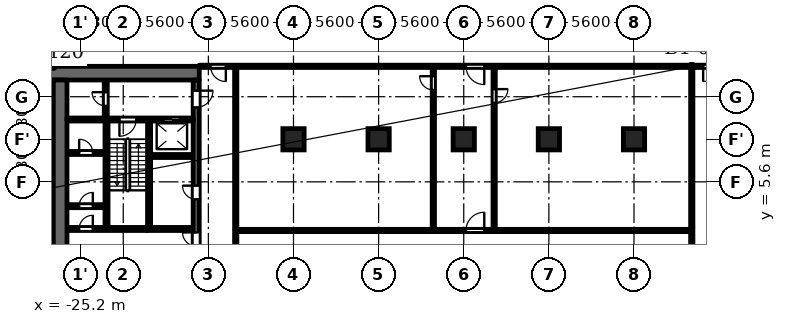
"""IFC4 building model, lengths in metres.
Left out: names, types, materials, properties, quantities, classifications, styles, units other than length and angle.
Written with IfcOpenShell. Run it as: python <this file> out.ifc"""

import sys

from ifc_helpers import new_model, si_unit, direction, frame, frame_2d, origin, origin_2d, place, context, subcontext, project, spatial, polyline, rectangle, outline, extrude, element, fill, save


model = new_model("IFC4")
c1 = context("Model", 3, precision=1e-05, world=origin(), true_north=direction((0.0, 1.0)))
c2 = subcontext(c1, "Body", "Model", "MODEL_VIEW")
j1 = project(units=[si_unit("LENGTHUNIT", "METRE"), si_unit("PLANEANGLEUNIT", "RADIAN")], contexts=[c1])
p1 = place(None, origin())
s1 = spatial("IfcSite", under=j1, at=p1, CompositionType="ELEMENT")
p2 = place(p1, origin())
s2 = spatial("IfcBuilding", under=s1, at=p2, CompositionType="ELEMENT")
p3 = place(p2, frame((0.0, 0.0, -4.5)))
s3 = spatial("IfcBuildingStorey", under=s2, at=p3, CompositionType="ELEMENT", Elevation=-4.5)
p4 = place(p3, frame((0.0, 0.0, -0.5)))
e1 = element("IfcWall", 1, at=p4, inside=s3, PredefinedType="SOLIDWALL", context=c2, shape_type="SweptSolid", body=[
    extrude(outline(polyline([(-29.45, 10.0), (-28.95, 10.0), (-28.95, 14.49), (-28.472, 16.996), (-27.038, 19.105), (-26.144, 20.0), (-26.851, 20.0), (-27.425, 19.426), (-28.944, 17.191), (-29.45, 14.537), (-29.45, 10.0)])), origin(), (0.0, 0.0, 1.0), 5.0),
])
for number, where, z_axis, x_axis in (
    (2, (-28.0, 11.2, 0.0), (0.0, 0.0, 1.0), (1.0, 0.0, 0.0)),
    (3, (-28.0, 5.6, 0.0), (0.0, 0.0, 1.0), (1.0, 0.0, 0.0)),
):
    element("IfcColumn", number, at=place(p3, frame(where, z_axis=z_axis, x_axis=x_axis)), inside=s3, PredefinedType="COLUMN", context=c2, shape_type="SweptSolid", body=[
        extrude(rectangle(XDim=1.8, YDim=1.8, at=origin_2d()), origin(), (0.0, 0.0, 1.0), 4.5),
    ])
for number, where, z_axis, x_axis in (
    (4, (-11.2, 8.4, 0.0), (0.0, 0.0, 1.0), (1.0, 0.0, 0.0)),
    (5, (-5.6, 8.4, 0.0), (0.0, 0.0, 1.0), (1.0, 0.0, 0.0)),
    (6, (0.0, 8.4, 0.0), (0.0, 0.0, 1.0), (1.0, 0.0, 0.0)),
    (7, (5.6, 8.4, 0.0), (0.0, 0.0, 1.0), (1.0, 0.0, 0.0)),
    (8, (11.2, 8.4, 0.0), (0.0, 0.0, 1.0), (1.0, 0.0, 0.0)),
):
    element("IfcColumn", number, at=place(p3, frame(where, z_axis=z_axis, x_axis=x_axis)), inside=s3, PredefinedType="COLUMN", context=c2, shape_type="SweptSolid", body=[
        extrude(rectangle(XDim=1.4, YDim=1.4, at=origin_2d()), origin(), (0.0, 0.0, 1.0), 4.5),
    ])
p5 = place(p3, frame((-20.7, 2.6, 0.0), z_axis=(0.0, 0.0, 1.0), x_axis=(0.0, 1.0, 0.0)))
e9 = element("IfcWall", 9, at=p5, inside=s3, PredefinedType="SHEAR", context=c2, shape_type="SweptSolid", body=[
    extrude(rectangle(XDim=7.0, YDim=0.2, at=frame_2d((3.5, 0.0))), origin(), (0.0, 0.0, 1.0), 4.05),
])
p6 = place(p3, frame((-20.8, 2.5, 0.0), z_axis=(0.0, 0.0, 1.0), x_axis=(-1.0, 0.0, 0.0)))
e10 = element("IfcWall", 10, at=p6, inside=s3, PredefinedType="SHEAR", context=c2, shape_type="SweptSolid", body=[
    extrude(rectangle(XDim=5.3, YDim=0.2, at=frame_2d((2.65, 0.0))), origin(), (0.0, 0.0, 1.0), 4.05),
])
p7 = place(p6, frame((3.6, 0.0, 0.0)))
e11 = element("IfcOpeningElement", 11, at=p7, cuts=e10, PredefinedType="OPENING", context=c2, shape_type="SweptSolid", body=[
    extrude(rectangle(XDim=0.9, YDim=2.1, at=frame_2d((0.45, 1.05))), frame((0.0, 0.11, 0.0), z_axis=(0.0, -1.0, 0.0), x_axis=(1.0, 0.0, 0.0)), (0.0, 0.0, 1.0), 0.22),
])
p8 = place(p3, frame((-17.4, 12.75, 0.0), z_axis=(0.0, 0.0, 1.0), x_axis=(-1.0, 0.0, 0.0)))
e12 = element("IfcWall", 12, at=p8, inside=s3, PredefinedType="SHEAR", context=c2, shape_type="SweptSolid", body=[
    extrude(rectangle(XDim=10.4, YDim=0.9, at=frame_2d((5.2, 0.0))), origin(), (0.0, 0.0, 1.0), 4.05),
])
p9 = place(p3, frame((-17.6, -12.3, 0.0), z_axis=(0.0, 0.0, 1.0), x_axis=(0.0, 1.0, 0.0)))
e13 = element("IfcWall", 13, at=p9, inside=s3, PredefinedType="SHEAR", context=c2, shape_type="SweptSolid", body=[
    extrude(rectangle(XDim=24.6, YDim=0.4, at=frame_2d((12.3, 0.0))), origin(), (0.0, 0.0, 1.0), 4.05),
])
p10 = place(p9, frame((6.0, 0.0, 0.0)))
e14 = element("IfcOpeningElement", 14, at=p10, cuts=e13, PredefinedType="OPENING", context=c2, shape_type="SweptSolid", body=[
    extrude(rectangle(XDim=1.1, YDim=2.1, at=frame_2d((0.55, 1.05))), frame((0.0, 0.21, 0.0), z_axis=(0.0, -1.0, 0.0), x_axis=(1.0, 0.0, 0.0)), (0.0, 0.0, 1.0), 0.42),
])
p11 = place(p9, frame((8.4, 0.0, 0.0)))
e15 = element("IfcOpeningElement", 15, at=p11, cuts=e13, PredefinedType="OPENING", context=c2, shape_type="SweptSolid", body=[
    extrude(rectangle(XDim=1.1, YDim=2.1, at=frame_2d((0.55, 1.05))), frame((0.0, 0.21, 0.0), z_axis=(0.0, -1.0, 0.0), x_axis=(1.0, 0.0, 0.0)), (0.0, 0.0, 1.0), 0.42),
])
p12 = place(p9, frame((10.8, 0.0, 0.0)))
e16 = element("IfcOpeningElement", 16, at=p12, cuts=e13, PredefinedType="OPENING", context=c2, shape_type="SweptSolid", body=[
    extrude(rectangle(XDim=1.1, YDim=2.1, at=frame_2d((0.55, 1.05))), frame((0.0, 0.21, 0.0), z_axis=(0.0, -1.0, 0.0), x_axis=(1.0, 0.0, 0.0)), (0.0, 0.0, 1.0), 0.42),
])
p13 = place(p9, frame((16.75, 0.0, 0.0)))
e17 = element("IfcOpeningElement", 17, at=p13, cuts=e13, PredefinedType="OPENING", context=c2, shape_type="SweptSolid", body=[
    extrude(rectangle(XDim=0.9, YDim=2.1, at=frame_2d((0.45, 1.05))), frame((0.0, 0.21, 0.0), z_axis=(0.0, -1.0, 0.0), x_axis=(1.0, 0.0, 0.0)), (0.0, 0.0, 1.0), 0.42),
])
p14 = place(p9, frame((22.8, 0.0, 0.0)))
e18 = element("IfcOpeningElement", 18, at=p14, cuts=e13, PredefinedType="OPENING", context=c2, shape_type="SweptSolid", body=[
    extrude(rectangle(XDim=1.1, YDim=2.1, at=frame_2d((0.55, 1.05))), frame((0.0, 0.21, 0.0), z_axis=(0.0, -1.0, 0.0), x_axis=(1.0, 0.0, 0.0)), (0.0, 0.0, 1.0), 0.42),
])
p15 = place(p9, frame((0.7, 0.0, 0.0)))
e19 = element("IfcOpeningElement", 19, at=p15, cuts=e13, PredefinedType="OPENING", context=c2, shape_type="SweptSolid", body=[
    extrude(rectangle(XDim=1.1, YDim=2.1, at=frame_2d((0.55, 1.05))), frame((0.0, 0.21, 0.0), z_axis=(0.0, -1.0, 0.0), x_axis=(1.0, 0.0, 0.0)), (0.0, 0.0, 1.0), 0.42),
])
p16 = place(p9, frame((12.775, 0.0, 0.0)))
e20 = element("IfcOpeningElement", 20, at=p16, cuts=e13, PredefinedType="OPENING", context=c2, shape_type="SweptSolid", body=[
    extrude(rectangle(XDim=1.8, YDim=2.1, at=frame_2d((0.9, 1.05))), frame((0.0, 0.21, 0.0), z_axis=(0.0, -1.0, 0.0), x_axis=(1.0, 0.0, 0.0)), (0.0, 0.0, 1.0), 0.42),
])
p17 = place(p3, frame((-26.55, -12.3, 0.0), z_axis=(0.0, 0.0, 1.0), x_axis=(0.0, 1.0, 0.0)))
e21 = element("IfcWall", 21, at=p17, inside=s3, PredefinedType="SHEAR", context=c2, shape_type="SweptSolid", body=[
    extrude(rectangle(XDim=24.6, YDim=0.9, at=frame_2d((12.3, 0.0))), origin(), (0.0, 0.0, 1.0), 4.05),
])
p18 = place(p3, frame((-23.55, 9.8, 0.0), z_axis=(0.0, 0.0, 1.0), x_axis=(0.0, 1.0, 0.0)))
e22 = element("IfcWall", 22, at=p18, inside=s3, PredefinedType="PARTITIONING", context=c2, shape_type="SweptSolid", body=[
    extrude(rectangle(XDim=2.5, YDim=0.2, at=frame_2d((1.25, 0.0))), origin(), (0.0, 0.0, 1.0), 4.05),
])
p19 = place(p18, frame((0.8, 0.0, 0.0)))
e23 = element("IfcOpeningElement", 23, at=p19, cuts=e22, PredefinedType="OPENING", context=c2, shape_type="SweptSolid", body=[
    extrude(rectangle(XDim=0.9, YDim=2.1, at=frame_2d((0.45, 1.05))), frame((0.0, 0.11, 0.0), z_axis=(0.0, -1.0, 0.0), x_axis=(1.0, 0.0, 0.0)), (0.0, 0.0, 1.0), 0.22),
])
p20 = place(p3, frame((-23.6, 4.0, 0.0), z_axis=(0.0, 0.0, 1.0), x_axis=(-1.0, 0.0, 0.0)))
e24 = element("IfcWall", 24, at=p20, inside=s3, PredefinedType="PARTITIONING", context=c2, shape_type="SweptSolid", body=[
    extrude(rectangle(XDim=2.5, YDim=0.2, at=frame_2d((1.25, 0.0))), origin(), (0.0, 0.0, 1.0), 4.05),
])
p21 = place(p20, frame((0.8, 0.0, 0.0)))
e25 = element("IfcOpeningElement", 25, at=p21, cuts=e24, PredefinedType="OPENING", context=c2, shape_type="SweptSolid", body=[
    extrude(rectangle(XDim=0.9, YDim=2.1, at=frame_2d((0.45, 1.05))), frame((0.0, 0.11, 0.0), z_axis=(0.0, -1.0, 0.0), x_axis=(1.0, 0.0, 0.0)), (0.0, 0.0, 1.0), 0.22),
])
p22 = place(p3, frame((-23.6, 7.5, 0.0), z_axis=(0.0, 0.0, 1.0), x_axis=(-1.0, 0.0, 0.0)))
e26 = element("IfcWall", 26, at=p22, inside=s3, PredefinedType="PARTITIONING", context=c2, shape_type="SweptSolid", body=[
    extrude(rectangle(XDim=2.5, YDim=0.2, at=frame_2d((1.25, 0.0))), origin(), (0.0, 0.0, 1.0), 4.05),
])
p23 = place(p22, frame((0.8, 0.0, 0.0)))
e27 = element("IfcOpeningElement", 27, at=p23, cuts=e26, PredefinedType="OPENING", context=c2, shape_type="SweptSolid", body=[
    extrude(rectangle(XDim=0.9, YDim=2.1, at=frame_2d((0.45, 1.05))), frame((0.0, 0.11, 0.0), z_axis=(0.0, -1.0, 0.0), x_axis=(1.0, 0.0, 0.0)), (0.0, 0.0, 1.0), 0.22),
])
p24 = place(p3, frame((-17.8, 2.5, 0.0), z_axis=(0.0, 0.0, 1.0), x_axis=(-1.0, 0.0, 0.0)))
e28 = element("IfcWall", 28, at=p24, inside=s3, PredefinedType="PARTITIONING", context=c2, shape_type="SweptSolid", body=[
    extrude(rectangle(XDim=3.0, YDim=0.2, at=frame_2d((1.5, 0.0))), origin(), (0.0, 0.0, 1.0), 4.05),
])
p25 = place(p3, frame((-17.8, 7.3, 0.0), z_axis=(0.0, 0.0, 1.0), x_axis=(-1.0, 0.0, 0.0)))
e29 = element("IfcWall", 29, at=p25, inside=s3, PredefinedType="PARTITIONING", context=c2, shape_type="SweptSolid", body=[
    extrude(rectangle(XDim=2.8, YDim=0.2, at=frame_2d((1.4, 0.0))), origin(), (0.0, 0.0, 1.0), 4.05),
])
p26 = place(p3, frame((-17.8, 9.7, 0.0), z_axis=(0.0, 0.0, 1.0), x_axis=(-1.0, 0.0, 0.0)))
e30 = element("IfcWall", 30, at=p26, inside=s3, PredefinedType="SHEAR", context=c2, shape_type="SweptSolid", body=[
    extrude(rectangle(XDim=8.3, YDim=0.2, at=frame_2d((4.15, 0.0))), origin(), (0.0, 0.0, 1.0), 4.05),
])
p27 = place(p26, frame((0.85, 0.0, 0.0)))
e31 = element("IfcOpeningElement", 31, at=p27, cuts=e30, PredefinedType="OPENING", context=c2, shape_type="SweptSolid", body=[
    extrude(rectangle(XDim=1.1, YDim=2.1, at=frame_2d((0.55, 1.05))), frame((0.0, 0.11, 0.0), z_axis=(0.0, -1.0, 0.0), x_axis=(1.0, 0.0, 0.0)), (0.0, 0.0, 1.0), 0.22),
])
p28 = place(p26, frame((3.75, 0.0, 0.0)))
e32 = element("IfcOpeningElement", 32, at=p28, cuts=e30, PredefinedType="OPENING", context=c2, shape_type="SweptSolid", body=[
    extrude(rectangle(XDim=1.1, YDim=2.1, at=frame_2d((0.55, 1.05))), frame((0.0, 0.11, 0.0), z_axis=(0.0, -1.0, 0.0), x_axis=(1.0, 0.0, 0.0)), (0.0, 0.0, 1.0), 0.22),
])
p29 = place(p3, frame((-23.5, 2.6, 0.0), z_axis=(0.0, 0.0, 1.0), x_axis=(0.0, 1.0, 0.0)))
e33 = element("IfcWall", 33, at=p29, inside=s3, PredefinedType="SHEAR", context=c2, shape_type="SweptSolid", body=[
    extrude(rectangle(XDim=7.0, YDim=0.2, at=frame_2d((3.5, 0.0))), origin(), (0.0, 0.0, 1.0), 4.05),
])
p30 = place(p3, frame((-14.925, 2.4, 0.0), z_axis=(0.0, 0.0, 1.0), x_axis=(1.0, 0.0, 0.0)))
e34 = element("IfcWall", 34, at=p30, inside=s3, PredefinedType="PARTITIONING", context=c2, shape_type="SweptSolid", body=[
    extrude(rectangle(XDim=29.85, YDim=0.15, at=frame_2d((14.925, 0.0))), origin(), (0.0, 0.0, 1.0), 4.05),
])
p31 = place(p30, frame((15.075, 0.0, 0.0)))
e35 = element("IfcOpeningElement", 35, at=p31, cuts=e34, PredefinedType="OPENING", context=c2, shape_type="SweptSolid", body=[
    extrude(rectangle(XDim=1.2, YDim=2.1, at=frame_2d((0.6, 1.05))), frame((0.0, 0.085, 0.0), z_axis=(0.0, -1.0, 0.0), x_axis=(1.0, 0.0, 0.0)), (0.0, 0.0, 1.0), 0.17),
])
p32 = place(p3, frame((-17.4, 13.2, 0.0), z_axis=(0.0, 0.0, 1.0), x_axis=(1.0, 0.0, 0.0)))
e36 = element("IfcWall", 36, at=p32, inside=s3, PredefinedType="PARTITIONING", context=c2, shape_type="SweptSolid", body=[
    extrude(rectangle(XDim=34.8, YDim=0.15, at=frame_2d((17.4, 0.0))), origin(), (0.0, 0.0, 1.0), 4.05),
])
p33 = place(p32, frame((17.55, 0.0, 0.0)))
e37 = element("IfcOpeningElement", 37, at=p33, cuts=e36, PredefinedType="OPENING", context=c2, shape_type="SweptSolid", body=[
    extrude(rectangle(XDim=1.2, YDim=2.1, at=frame_2d((0.6, 1.05))), frame((0.0, 0.085, 0.0), z_axis=(0.0, -1.0, 0.0), x_axis=(1.0, 0.0, 0.0)), (0.0, 0.0, 1.0), 0.17),
])
p34 = place(p32, frame((0.75, 0.0, 0.0)))
e38 = element("IfcOpeningElement", 38, at=p34, cuts=e36, PredefinedType="OPENING", context=c2, shape_type="SweptSolid", body=[
    extrude(rectangle(XDim=1.0, YDim=2.1, at=frame_2d((0.5, 1.05))), frame((0.0, 0.085, 0.0), z_axis=(0.0, -1.0, 0.0), x_axis=(1.0, 0.0, 0.0)), (0.0, 0.0, 1.0), 0.17),
])
p35 = place(p32, frame((33.15, 0.0, 0.0)))
e39 = element("IfcOpeningElement", 39, at=p35, cuts=e36, PredefinedType="OPENING", context=c2, shape_type="SweptSolid", body=[
    extrude(rectangle(XDim=1.0, YDim=2.1, at=frame_2d((0.5, 1.05))), frame((0.0, 0.085, 0.0), z_axis=(0.0, -1.0, 0.0), x_axis=(1.0, 0.0, 0.0)), (0.0, 0.0, 1.0), 0.17),
])
p36 = place(p3, frame((-15.0, -13.125, 0.0), z_axis=(0.0, 0.0, 1.0), x_axis=(0.0, 1.0, 0.0)))
e40 = element("IfcWall", 40, at=p36, inside=s3, PredefinedType="PARTITIONING", context=c2, shape_type="SweptSolid", body=[
    extrude(rectangle(XDim=26.25, YDim=0.15, at=frame_2d((13.125, 0.0))), origin(), (0.0, 0.0, 1.0), 4.05),
])
p37 = place(p36, frame((11.375, 0.0, 0.0)))
e41 = element("IfcOpeningElement", 41, at=p37, cuts=e40, PredefinedType="OPENING", context=c2, shape_type="SweptSolid", body=[
    extrude(rectangle(XDim=1.0, YDim=2.1, at=frame_2d((0.5, 1.05))), frame((0.0, 0.085, 0.0), z_axis=(0.0, -1.0, 0.0), x_axis=(1.0, 0.0, 0.0)), (0.0, 0.0, 1.0), 0.17),
])
p38 = place(p3, frame((-2.0, 2.475, 0.0), z_axis=(0.0, 0.0, 1.0), x_axis=(0.0, 1.0, 0.0)))
e42 = element("IfcWall", 42, at=p38, inside=s3, PredefinedType="PARTITIONING", context=c2, shape_type="SweptSolid", body=[
    extrude(rectangle(XDim=10.65, YDim=0.15, at=frame_2d((5.325, 0.0))), origin(), (0.0, 0.0, 1.0), 4.05),
])
p39 = place(p38, frame((9.175, 0.0, 0.0)))
e43 = element("IfcOpeningElement", 43, at=p39, cuts=e42, PredefinedType="OPENING", context=c2, shape_type="SweptSolid", body=[
    extrude(rectangle(XDim=0.9, YDim=2.1, at=frame_2d((0.45, 1.05))), frame((0.0, 0.085, 0.0), z_axis=(0.0, -1.0, 0.0), x_axis=(1.0, 0.0, 0.0)), (0.0, 0.0, 1.0), 0.17),
])
p40 = place(p3, frame((2.0, 2.475, 0.0), z_axis=(0.0, 0.0, 1.0), x_axis=(0.0, 1.0, 0.0)))
e44 = element("IfcWall", 44, at=p40, inside=s3, PredefinedType="PARTITIONING", context=c2, shape_type="SweptSolid", body=[
    extrude(rectangle(XDim=10.65, YDim=0.15, at=frame_2d((5.325, 0.0))), origin(), (0.0, 0.0, 1.0), 4.05),
])
p41 = place(p40, frame((8.325, 0.0, 0.0)))
e45 = element("IfcOpeningElement", 45, at=p41, cuts=e44, PredefinedType="OPENING", context=c2, shape_type="SweptSolid", body=[
    extrude(rectangle(XDim=0.9, YDim=2.1, at=frame_2d((0.45, 1.05))), frame((0.0, 0.085, 0.0), z_axis=(0.0, -1.0, 0.0), x_axis=(1.0, 0.0, 0.0)), (0.0, 0.0, 1.0), 0.17),
])
p42 = place(p3, frame((15.0, -13.125, 0.0), z_axis=(0.0, 0.0, 1.0), x_axis=(0.0, 1.0, 0.0)))
e46 = element("IfcWall", 46, at=p42, inside=s3, PredefinedType="PARTITIONING", context=c2, shape_type="SweptSolid", body=[
    extrude(rectangle(XDim=26.25, YDim=0.15, at=frame_2d((13.125, 0.0))), origin(), (0.0, 0.0, 1.0), 4.05),
])
p43 = place(p42, frame((11.375, 0.0, 0.0)))
e47 = element("IfcOpeningElement", 47, at=p43, cuts=e46, PredefinedType="OPENING", context=c2, shape_type="SweptSolid", body=[
    extrude(rectangle(XDim=1.0, YDim=2.1, at=frame_2d((0.5, 1.05))), frame((0.0, 0.085, 0.0), z_axis=(0.0, -1.0, 0.0), x_axis=(1.0, 0.0, 0.0)), (0.0, 0.0, 1.0), 0.17),
])
p44 = place(p13, origin())
e48 = element("IfcDoor", 48, at=p44, inside=s3, OperationType="SINGLE_SWING_LEFT", PredefinedType="DOOR", context=c2, shape_type="SweptSolid", body=[
    extrude(rectangle(XDim=0.9, YDim=2.1, at=frame_2d((0.45, 1.05))), frame((0.0, 0.025, 0.0), z_axis=(0.0, -1.0, 0.0), x_axis=(1.0, 0.0, 0.0)), (0.0, 0.0, 1.0), 0.05),
])
fill(e17, e48)
p45 = place(p27, origin())
e49 = element("IfcDoor", 49, at=p45, inside=s3, OperationType="DOUBLE_DOOR_SLIDING", PredefinedType="DOOR", context=c2, shape_type="SweptSolid", body=[
    extrude(rectangle(XDim=1.1, YDim=2.1, at=frame_2d((0.55, 1.05))), frame((0.0, 0.025, 0.0), z_axis=(0.0, -1.0, 0.0), x_axis=(1.0, 0.0, 0.0)), (0.0, 0.0, 1.0), 0.05),
])
fill(e31, e49)
p46 = place(p14, origin())
e50 = element("IfcDoor", 50, at=p46, inside=s3, OperationType="SINGLE_SWING_RIGHT", PredefinedType="DOOR", context=c2, shape_type="SweptSolid", body=[
    extrude(rectangle(XDim=1.1, YDim=2.1, at=frame_2d((0.55, 1.05))), frame((0.0, 0.025, 0.0), z_axis=(0.0, -1.0, 0.0), x_axis=(1.0, 0.0, 0.0)), (0.0, 0.0, 1.0), 0.05),
])
fill(e18, e50)
p47 = place(p19, origin())
e51 = element("IfcDoor", 51, at=p47, inside=s3, OperationType="SINGLE_SWING_LEFT", PredefinedType="DOOR", context=c2, shape_type="SweptSolid", body=[
    extrude(rectangle(XDim=0.9, YDim=2.1, at=frame_2d((0.45, 1.05))), frame((0.0, 0.025, 0.0), z_axis=(0.0, -1.0, 0.0), x_axis=(1.0, 0.0, 0.0)), (0.0, 0.0, 1.0), 0.05),
])
fill(e23, e51)
p48 = place(p28, origin())
e52 = element("IfcDoor", 52, at=p48, inside=s3, OperationType="SINGLE_SWING_LEFT", PredefinedType="DOOR", context=c2, shape_type="SweptSolid", body=[
    extrude(rectangle(XDim=1.1, YDim=2.1, at=frame_2d((0.55, 1.05))), frame((0.0, 0.025, 0.0), z_axis=(0.0, -1.0, 0.0), x_axis=(1.0, 0.0, 0.0)), (0.0, 0.0, 1.0), 0.05),
])
fill(e32, e52)
p49 = place(p16, origin())
e53 = element("IfcDoor", 53, at=p49, inside=s3, OperationType="DOUBLE_DOOR_SINGLE_SWING", PredefinedType="DOOR", context=c2, shape_type="SweptSolid", body=[
    extrude(rectangle(XDim=1.8, YDim=2.1, at=frame_2d((0.9, 1.05))), frame((0.0, 0.025, 0.0), z_axis=(0.0, -1.0, 0.0), x_axis=(1.0, 0.0, 0.0)), (0.0, 0.0, 1.0), 0.05),
])
fill(e20, e53)
p50 = place(p21, origin())
e54 = element("IfcDoor", 54, at=p50, inside=s3, OperationType="SINGLE_SWING_LEFT", PredefinedType="DOOR", context=c2, shape_type="SweptSolid", body=[
    extrude(rectangle(XDim=0.9, YDim=2.1, at=frame_2d((0.45, 1.05))), frame((0.0, 0.025, 0.0), z_axis=(0.0, -1.0, 0.0), x_axis=(1.0, 0.0, 0.0)), (0.0, 0.0, 1.0), 0.05),
])
fill(e25, e54)
p51 = place(p23, origin())
e55 = element("IfcDoor", 55, at=p51, inside=s3, OperationType="SINGLE_SWING_RIGHT", PredefinedType="DOOR", context=c2, shape_type="SweptSolid", body=[
    extrude(rectangle(XDim=0.9, YDim=2.1, at=frame_2d((0.45, 1.05))), frame((0.0, 0.025, 0.0), z_axis=(0.0, -1.0, 0.0), x_axis=(1.0, 0.0, 0.0)), (0.0, 0.0, 1.0), 0.05),
])
fill(e27, e55)
p52 = place(p7, origin())
e56 = element("IfcDoor", 56, at=p52, inside=s3, OperationType="SINGLE_SWING_LEFT", PredefinedType="DOOR", context=c2, shape_type="SweptSolid", body=[
    extrude(rectangle(XDim=0.9, YDim=2.1, at=frame_2d((0.45, 1.05))), frame((0.0, 0.025, 0.0), z_axis=(0.0, -1.0, 0.0), x_axis=(1.0, 0.0, 0.0)), (0.0, 0.0, 1.0), 0.05),
])
fill(e11, e56)
p53 = place(p31, origin())
e57 = element("IfcDoor", 57, at=p53, inside=s3, OperationType="SINGLE_SWING_LEFT", PredefinedType="DOOR", context=c2, shape_type="SweptSolid", body=[
    extrude(rectangle(XDim=1.2, YDim=2.1, at=frame_2d((0.6, 1.05))), frame((0.0, 0.025, 0.0), z_axis=(0.0, -1.0, 0.0), x_axis=(1.0, 0.0, 0.0)), (0.0, 0.0, 1.0), 0.05),
])
fill(e35, e57)
p54 = place(p33, origin())
e58 = element("IfcDoor", 58, at=p54, inside=s3, OperationType="SINGLE_SWING_RIGHT", PredefinedType="DOOR", context=c2, shape_type="SweptSolid", body=[
    extrude(rectangle(XDim=1.2, YDim=2.1, at=frame_2d((0.6, 1.05))), frame((0.0, 0.025, 0.0), z_axis=(0.0, -1.0, 0.0), x_axis=(1.0, 0.0, 0.0)), (0.0, 0.0, 1.0), 0.05),
])
fill(e37, e58)
p55 = place(p34, origin())
e59 = element("IfcDoor", 59, at=p55, inside=s3, OperationType="SINGLE_SWING_RIGHT", PredefinedType="DOOR", context=c2, shape_type="SweptSolid", body=[
    extrude(rectangle(XDim=1.0, YDim=2.1, at=frame_2d((0.5, 1.05))), frame((0.0, 0.025, 0.0), z_axis=(0.0, -1.0, 0.0), x_axis=(1.0, 0.0, 0.0)), (0.0, 0.0, 1.0), 0.05),
])
fill(e38, e59)
p56 = place(p35, origin())
e60 = element("IfcDoor", 60, at=p56, inside=s3, OperationType="SINGLE_SWING_LEFT", PredefinedType="DOOR", context=c2, shape_type="SweptSolid", body=[
    extrude(rectangle(XDim=1.0, YDim=2.1, at=frame_2d((0.5, 1.05))), frame((0.0, 0.025, 0.0), z_axis=(0.0, -1.0, 0.0), x_axis=(1.0, 0.0, 0.0)), (0.0, 0.0, 1.0), 0.05),
])
fill(e39, e60)
p57 = place(p39, origin())
e61 = element("IfcDoor", 61, at=p57, inside=s3, OperationType="SINGLE_SWING_LEFT", PredefinedType="DOOR", context=c2, shape_type="SweptSolid", body=[
    extrude(rectangle(XDim=0.9, YDim=2.1, at=frame_2d((0.45, 1.05))), frame((0.0, 0.025, 0.0), z_axis=(0.0, -1.0, 0.0), x_axis=(1.0, 0.0, 0.0)), (0.0, 0.0, 1.0), 0.05),
])
fill(e43, e61)
p58 = place(p41, origin())
e62 = element("IfcDoor", 62, at=p58, inside=s3, OperationType="SINGLE_SWING_RIGHT", PredefinedType="DOOR", context=c2, shape_type="SweptSolid", body=[
    extrude(rectangle(XDim=0.9, YDim=2.1, at=frame_2d((0.45, 1.05))), frame((0.0, 0.025, 0.0), z_axis=(0.0, -1.0, 0.0), x_axis=(1.0, 0.0, 0.0)), (0.0, 0.0, 1.0), 0.05),
])
fill(e45, e62)
save(model, sys.argv[1])
